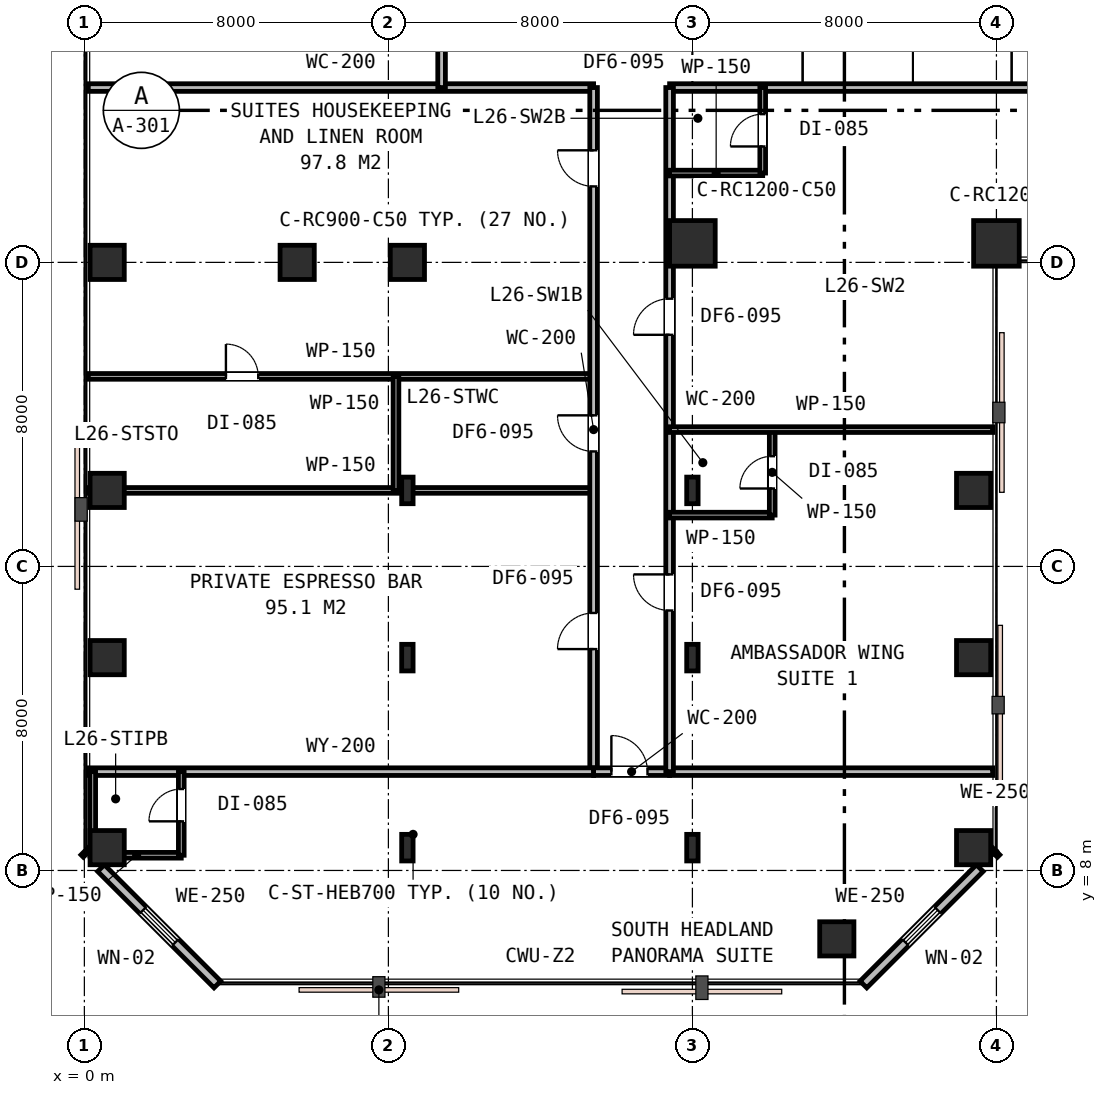
"""IFC4 building model, lengths in metres.
Left out: names, types, materials, properties, quantities, classifications, styles, units other than length and angle.
Written with IfcOpenShell. Run it as: python <this file> out.ifc"""

import sys

from ifc_helpers import new_model, si_unit, direction, frame, frame_2d, origin, origin_2d, place, context, subcontext, project, spatial, rectangle, i_section, extrude, element, fill, save


model = new_model("IFC4")
c1 = context("Model", 3, precision=1e-05, world=origin(), true_north=direction((0.0, 1.0)))
c2 = subcontext(c1, "Body", "Model", "MODEL_VIEW")
j1 = project(units=[si_unit("LENGTHUNIT", "METRE"), si_unit("PLANEANGLEUNIT", "RADIAN")], contexts=[c1])
p1 = place(None, origin())
s1 = spatial("IfcSite", under=j1, at=p1, CompositionType="ELEMENT")
p2 = place(p1, origin())
s2 = spatial("IfcBuilding", under=s1, at=p2, CompositionType="ELEMENT")
p3 = place(p2, frame((0.0, 0.0, 104.4)))
s3 = spatial("IfcBuildingStorey", under=s2, at=p3, CompositionType="ELEMENT", Elevation=104.4)
p4 = place(p3, frame((8.5, 24.0, 0.0), z_axis=(0.0, 0.0, 1.0), x_axis=(1.0, 0.0, 0.0)))
e1 = element("IfcColumn", 1, at=p4, inside=s3, PredefinedType="COLUMN", context=c2, shape_type="SweptSolid", body=[
    extrude(rectangle(XDim=0.9, YDim=0.9, at=origin_2d()), origin(), (0.0, 0.0, 1.0), 3.6),
])
for number, where, z_axis, x_axis in (
    (2, (16.0, 24.5, 0.0), (0.0, 0.0, 1.0), (1.0, 0.0, 0.0)),
    (3, (24.0, 24.5, 0.0), (0.0, 0.0, 1.0), (1.0, 0.0, 0.0)),
):
    element("IfcColumn", number, at=place(p3, frame(where, z_axis=z_axis, x_axis=x_axis)), inside=s3, PredefinedType="COLUMN", context=c2, shape_type="SweptSolid", body=[
        extrude(rectangle(XDim=1.2, YDim=1.2, at=origin_2d()), origin(), (0.0, 0.0, 1.0), 3.6),
    ])
for number, where, z_axis, x_axis in (
    (4, (5.6, 24.0, 0.0), (0.0, 0.0, 1.0), (1.0, 0.0, 0.0)),
    (5, (0.6, 24.0, 0.0), (0.0, 0.0, 1.0), (1.0, 0.0, 0.0)),
    (6, (0.6, 8.6, 0.0), (0.0, 0.0, 1.0), (1.0, 0.0, 0.0)),
    (7, (0.6, 13.6, 0.0), (0.0, 0.0, 1.0), (1.0, 0.0, 0.0)),
    (8, (0.6, 18.0, 0.0), (0.0, 0.0, 1.0), (1.0, 0.0, 0.0)),
    (9, (19.8, 6.2, 0.0), (0.0, 0.0, 1.0), (1.0, 0.0, 0.0)),
    (10, (23.4, 8.6, 0.0), (0.0, 0.0, 1.0), (1.0, 0.0, 0.0)),
    (11, (23.4, 13.6, 0.0), (0.0, 0.0, 1.0), (1.0, 0.0, 0.0)),
    (12, (23.4, 18.0, 0.0), (0.0, 0.0, 1.0), (1.0, 0.0, 0.0)),
):
    element("IfcColumn", number, at=place(p3, frame(where, z_axis=z_axis, x_axis=x_axis)), inside=s3, PredefinedType="COLUMN", context=c2, shape_type="SweptSolid", body=[
        extrude(rectangle(XDim=0.9, YDim=0.9, at=origin_2d()), origin(), (0.0, 0.0, 1.0), 3.6),
    ])
for number, where, z_axis, x_axis in (
    (13, (8.5, 8.6, 0.0), (0.0, 0.0, 1.0), (1.0, 0.0, 0.0)),
    (14, (16.0, 8.6, 0.0), (0.0, 0.0, 1.0), (1.0, 0.0, 0.0)),
    (15, (8.5, 13.6, 0.0), (0.0, 0.0, 1.0), (1.0, 0.0, 0.0)),
    (16, (16.0, 13.6, 0.0), (0.0, 0.0, 1.0), (1.0, 0.0, 0.0)),
    (17, (8.5, 18.0, 0.0), (0.0, 0.0, 1.0), (1.0, 0.0, 0.0)),
    (18, (16.0, 18.0, 0.0), (0.0, 0.0, 1.0), (1.0, 0.0, 0.0)),
):
    element("IfcColumn", number, at=place(p3, frame(where, z_axis=z_axis, x_axis=x_axis)), inside=s3, PredefinedType="COLUMN", context=c2, shape_type="SweptSolid", body=[
        extrude(i_section(OverallWidth=0.3, OverallDepth=0.7, WebThickness=0.017, FlangeThickness=0.032, FilletRadius=0.027, at=origin_2d()), origin(), (0.0, 0.0, 1.0), 3.6),
    ])
p5 = place(p3, frame((20.5, 5.0, 0.0), z_axis=(0.0, 0.0, 1.0), x_axis=(0.707106781187, 0.707106781187, 0.0)))
e19 = element("IfcWall", 19, at=p5, inside=s3, PredefinedType="STANDARD", context=c2, shape_type="SweptSolid", body=[
    extrude(rectangle(XDim=4.33, YDim=0.25, at=frame_2d((2.165, 0.0))), origin(), (0.0, 0.0, 1.0), 3.33),
])
p6 = place(p5, frame((1.565, 0.0, 0.85)))
e20 = element("IfcOpeningElement", 20, at=p6, cuts=e19, PredefinedType="OPENING", context=c2, shape_type="SweptSolid", body=[
    extrude(rectangle(XDim=1.2, YDim=1.6, at=frame_2d((0.6, 0.8))), frame((0.0, 0.135, 0.0), z_axis=(0.0, -1.0, 0.0), x_axis=(1.0, 0.0, 0.0)), (0.0, 0.0, 1.0), 0.27),
])
for number, where, z_axis, x_axis in (
    (21, (23.938, 8.438, 0.0), (0.0, 0.0, 1.0), (0.707, 0.707, 0.0)),
    (22, (0.0, 8.5, 0.0), (0.0, 0.0, 1.0), (0.707, -0.707, 0.0)),
):
    element("IfcWall", number, at=place(p3, frame(where, z_axis=z_axis, x_axis=x_axis)), inside=s3, PredefinedType="STANDARD", context=c2, shape_type="SweptSolid", body=[
        extrude(rectangle(XDim=0.087, YDim=0.25, at=frame_2d((0.044, 0.0))), origin(), (0.0, 0.0, 1.0), 3.33),
    ])
p7 = place(p3, frame((0.438, 8.062, 0.0), z_axis=(0.0, 0.0, 1.0), x_axis=(0.707106781187, -0.707106781187, 0.0)))
e23 = element("IfcWall", 23, at=p7, inside=s3, PredefinedType="STANDARD", context=c2, shape_type="SweptSolid", body=[
    extrude(rectangle(XDim=4.33, YDim=0.25, at=frame_2d((2.165, 0.0))), origin(), (0.0, 0.0, 1.0), 3.33),
])
p8 = place(p7, frame((1.565, 0.0, 0.85)))
e24 = element("IfcOpeningElement", 24, at=p8, cuts=e23, PredefinedType="OPENING", context=c2, shape_type="SweptSolid", body=[
    extrude(rectangle(XDim=1.2, YDim=1.6, at=frame_2d((0.6, 0.8))), frame((0.0, 0.135, 0.0), z_axis=(0.0, -1.0, 0.0), x_axis=(1.0, 0.0, 0.0)), (0.0, 0.0, 1.0), 0.27),
])
p9 = place(p3, frame((0.1, 28.6, 0.0), z_axis=(0.0, 0.0, 1.0), x_axis=(1.0, 0.0, 0.0)))
e25 = element("IfcWall", 25, at=p9, inside=s3, PredefinedType="PARTITIONING", context=c2, shape_type="SweptSolid", body=[
    extrude(rectangle(XDim=13.3, YDim=0.2, at=frame_2d((6.65, 0.0))), origin(), (0.0, 0.0, 1.0), 2.87),
])
p10 = place(p3, frame((15.4, 28.6, 0.0), z_axis=(0.0, 0.0, 1.0), x_axis=(1.0, 0.0, 0.0)))
e26 = element("IfcWall", 26, at=p10, inside=s3, PredefinedType="PARTITIONING", context=c2, shape_type="SweptSolid", body=[
    extrude(rectangle(XDim=28.8, YDim=0.2, at=frame_2d((14.4, 0.0))), origin(), (0.0, 0.0, 1.0), 2.87),
])
p11 = place(p10, frame((12.41, 0.0, 0.0)))
e27 = element("IfcOpeningElement", 27, at=p11, cuts=e26, PredefinedType="OPENING", context=c2, shape_type="SweptSolid", body=[
    extrude(rectangle(XDim=0.95, YDim=2.15, at=frame_2d((0.475, 1.075))), frame((0.0, 0.11, 0.0), z_axis=(0.0, -1.0, 0.0), x_axis=(1.0, 0.0, 0.0)), (0.0, 0.0, 1.0), 0.22),
])
p12 = place(p10, frame((22.68, 0.0, 0.0)))
e28 = element("IfcOpeningElement", 28, at=p12, cuts=e26, PredefinedType="OPENING", context=c2, shape_type="SweptSolid", body=[
    extrude(rectangle(XDim=0.95, YDim=2.15, at=frame_2d((0.475, 1.075))), frame((0.0, 0.11, 0.0), z_axis=(0.0, -1.0, 0.0), x_axis=(1.0, 0.0, 0.0)), (0.0, 0.0, 1.0), 0.22),
])
p13 = place(p3, frame((0.1, 18.0, 0.0), z_axis=(0.0, 0.0, 1.0), x_axis=(1.0, 0.0, 0.0)))
e29 = element("IfcWall", 29, at=p13, inside=s3, PredefinedType="PARTITIONING", context=c2, shape_type="SweptSolid", body=[
    extrude(rectangle(XDim=13.3, YDim=0.15, at=frame_2d((6.65, 0.0))), origin(), (0.0, 0.0, 1.0), 2.87),
])
p14 = place(p3, frame((0.1, 21.0, 0.0), z_axis=(0.0, 0.0, 1.0), x_axis=(1.0, 0.0, 0.0)))
e30 = element("IfcWall", 30, at=p14, inside=s3, PredefinedType="PARTITIONING", context=c2, shape_type="SweptSolid", body=[
    extrude(rectangle(XDim=13.3, YDim=0.15, at=frame_2d((6.65, 0.0))), origin(), (0.0, 0.0, 1.0), 2.87),
])
p15 = place(p14, frame((3.625, 0.0, 0.0)))
e31 = element("IfcOpeningElement", 31, at=p15, cuts=e30, PredefinedType="OPENING", context=c2, shape_type="SweptSolid", body=[
    extrude(rectangle(XDim=0.85, YDim=2.15, at=frame_2d((0.425, 1.075))), frame((0.0, 0.085, 0.0), z_axis=(0.0, -1.0, 0.0), x_axis=(1.0, 0.0, 0.0)), (0.0, 0.0, 1.0), 0.17),
])
p16 = place(p3, frame((8.2, 18.0, 0.0), z_axis=(0.0, 0.0, 1.0), x_axis=(0.0, 1.0, 0.0)))
e32 = element("IfcWall", 32, at=p16, inside=s3, PredefinedType="PARTITIONING", context=c2, shape_type="SweptSolid", body=[
    extrude(rectangle(XDim=3.0, YDim=0.15, at=frame_2d((1.5, 0.0))), origin(), (0.0, 0.0, 1.0), 2.87),
])
p17 = place(p3, frame((13.4, 10.6, 0.0), z_axis=(0.0, 0.0, 1.0), x_axis=(0.0, 1.0, 0.0)))
e33 = element("IfcWall", 33, at=p17, inside=s3, PredefinedType="PARTITIONING", context=c2, shape_type="SweptSolid", body=[
    extrude(rectangle(XDim=18.0, YDim=0.2, at=frame_2d((9.0, 0.0))), origin(), (0.0, 0.0, 1.0), 2.87),
])
p18 = place(p17, frame((8.425, 0.0, 0.0)))
e34 = element("IfcOpeningElement", 34, at=p18, cuts=e33, PredefinedType="OPENING", context=c2, shape_type="SweptSolid", body=[
    extrude(rectangle(XDim=0.95, YDim=2.15, at=frame_2d((0.475, 1.075))), frame((0.0, 0.11, 0.0), z_axis=(0.0, -1.0, 0.0), x_axis=(1.0, 0.0, 0.0)), (0.0, 0.0, 1.0), 0.22),
])
p19 = place(p17, frame((15.399, 0.0, 0.0)))
e35 = element("IfcOpeningElement", 35, at=p19, cuts=e33, PredefinedType="OPENING", context=c2, shape_type="SweptSolid", body=[
    extrude(rectangle(XDim=0.95, YDim=2.15, at=frame_2d((0.475, 1.075))), frame((0.0, 0.11, 0.0), z_axis=(0.0, -1.0, 0.0), x_axis=(1.0, 0.0, 0.0)), (0.0, 0.0, 1.0), 0.22),
])
p20 = place(p17, frame((3.225, 0.0, 0.0)))
e36 = element("IfcOpeningElement", 36, at=p20, cuts=e33, PredefinedType="OPENING", context=c2, shape_type="SweptSolid", body=[
    extrude(rectangle(XDim=0.95, YDim=2.15, at=frame_2d((0.475, 1.075))), frame((0.0, 0.11, 0.0), z_axis=(0.0, -1.0, 0.0), x_axis=(1.0, 0.0, 0.0)), (0.0, 0.0, 1.0), 0.22),
])
p21 = place(p3, frame((9.4, 28.6, 0.0), z_axis=(0.0, 0.0, 1.0), x_axis=(0.0, 1.0, 0.0)))
e37 = element("IfcWall", 37, at=p21, inside=s3, PredefinedType="PARTITIONING", context=c2, shape_type="SweptSolid", body=[
    extrude(rectangle(XDim=12.9, YDim=0.2, at=frame_2d((6.45, 0.0))), origin(), (0.0, 0.0, 1.0), 2.87),
])
p22 = place(p21, frame((3.825, 0.0, 0.0)))
e38 = element("IfcOpeningElement", 38, at=p22, cuts=e37, PredefinedType="OPENING", context=c2, shape_type="SweptSolid", body=[
    extrude(rectangle(XDim=0.95, YDim=2.15, at=frame_2d((0.475, 1.075))), frame((0.0, 0.11, 0.0), z_axis=(0.0, -1.0, 0.0), x_axis=(1.0, 0.0, 0.0)), (0.0, 0.0, 1.0), 0.22),
])
p23 = place(p21, frame((9.175, 0.0, 0.0)))
e39 = element("IfcOpeningElement", 39, at=p23, cuts=e37, PredefinedType="OPENING", context=c2, shape_type="SweptSolid", body=[
    extrude(rectangle(XDim=0.95, YDim=2.15, at=frame_2d((0.475, 1.075))), frame((0.0, 0.11, 0.0), z_axis=(0.0, -1.0, 0.0), x_axis=(1.0, 0.0, 0.0)), (0.0, 0.0, 1.0), 0.22),
])
p24 = place(p3, frame((0.1, 10.6, 0.0), z_axis=(0.0, 0.0, 1.0), x_axis=(1.0, 0.0, 0.0)))
e40 = element("IfcWall", 40, at=p24, inside=s3, PredefinedType="PARTITIONING", context=c2, shape_type="SweptSolid", body=[
    extrude(rectangle(XDim=13.3, YDim=0.2, at=frame_2d((6.65, 0.0))), origin(), (0.0, 0.0, 1.0), 2.87),
])
p25 = place(p3, frame((15.4, 10.6, 0.0), z_axis=(0.0, 0.0, 1.0), x_axis=(1.0, 0.0, 0.0)))
e41 = element("IfcWall", 41, at=p25, inside=s3, PredefinedType="PARTITIONING", context=c2, shape_type="SweptSolid", body=[
    extrude(rectangle(XDim=8.5, YDim=0.2, at=frame_2d((4.25, 0.0))), origin(), (0.0, 0.0, 1.0), 2.87),
])
p26 = place(p3, frame((13.4, 10.6, 0.0), z_axis=(0.0, 0.0, 1.0), x_axis=(1.0, 0.0, 0.0)))
e42 = element("IfcWall", 42, at=p26, inside=s3, PredefinedType="PARTITIONING", context=c2, shape_type="SweptSolid", body=[
    extrude(rectangle(XDim=2.0, YDim=0.2, at=frame_2d((1.0, 0.0))), origin(), (0.0, 0.0, 1.0), 3.01),
])
p27 = place(p26, frame((0.468, 0.0, 0.0)))
e43 = element("IfcOpeningElement", 43, at=p27, cuts=e42, PredefinedType="OPENING", context=c2, shape_type="SweptSolid", body=[
    extrude(rectangle(XDim=0.95, YDim=2.15, at=frame_2d((0.475, 1.075))), frame((0.0, 0.11, 0.0), z_axis=(0.0, -1.0, 0.0), x_axis=(1.0, 0.0, 0.0)), (0.0, 0.0, 1.0), 0.22),
])
p28 = place(p3, frame((0.2, 8.4, 0.0), z_axis=(0.0, 0.0, 1.0), x_axis=(1.0, 0.0, 0.0)))
e44 = element("IfcWall", 44, at=p28, inside=s3, PredefinedType="PARTITIONING", context=c2, shape_type="SweptSolid", body=[
    extrude(rectangle(XDim=2.35, YDim=0.15, at=frame_2d((1.175, 0.0))), origin(), (0.0, 0.0, 1.0), 2.87),
])
p29 = place(p3, frame((2.55, 8.4, 0.0), z_axis=(0.0, 0.0, 1.0), x_axis=(0.0, 1.0, 0.0)))
e45 = element("IfcWall", 45, at=p29, inside=s3, PredefinedType="PARTITIONING", context=c2, shape_type="SweptSolid", body=[
    extrude(rectangle(XDim=2.2, YDim=0.15, at=frame_2d((1.1, 0.0))), origin(), (0.0, 0.0, 1.0), 2.87),
])
p30 = place(p29, frame((0.892, 0.0, 0.0)))
e46 = element("IfcOpeningElement", 46, at=p30, cuts=e45, PredefinedType="OPENING", context=c2, shape_type="SweptSolid", body=[
    extrude(rectangle(XDim=0.85, YDim=2.15, at=frame_2d((0.425, 1.075))), frame((0.0, 0.085, 0.0), z_axis=(0.0, -1.0, 0.0), x_axis=(1.0, 0.0, 0.0)), (0.0, 0.0, 1.0), 0.17),
])
p31 = place(p3, frame((0.22, 8.38, 0.0), z_axis=(0.0, 0.0, 1.0), x_axis=(0.0, 1.0, 0.0)))
e47 = element("IfcWall", 47, at=p31, inside=s3, PredefinedType="PARTITIONING", context=c2, shape_type="SweptSolid", body=[
    extrude(rectangle(XDim=2.22, YDim=0.15, at=frame_2d((1.11, 0.0))), origin(), (0.0, 0.0, 1.0), 2.87),
])
p32 = place(p3, frame((15.4, 10.6, 0.0), z_axis=(0.0, 0.0, 1.0), x_axis=(0.0, 1.0, 0.0)))
e48 = element("IfcWall", 48, at=p32, inside=s3, PredefinedType="PARTITIONING", context=c2, shape_type="SweptSolid", body=[
    extrude(rectangle(XDim=18.0, YDim=0.2, at=frame_2d((9.0, 0.0))), origin(), (0.0, 0.0, 1.0), 2.87),
])
p33 = place(p32, frame((4.24, 0.0, 0.0)))
e49 = element("IfcOpeningElement", 49, at=p33, cuts=e48, PredefinedType="OPENING", context=c2, shape_type="SweptSolid", body=[
    extrude(rectangle(XDim=0.95, YDim=2.15, at=frame_2d((0.475, 1.075))), frame((0.0, 0.11, 0.0), z_axis=(0.0, -1.0, 0.0), x_axis=(1.0, 0.0, 0.0)), (0.0, 0.0, 1.0), 0.22),
])
p34 = place(p32, frame((11.494, 0.0, 0.0)))
e50 = element("IfcOpeningElement", 50, at=p34, cuts=e48, PredefinedType="OPENING", context=c2, shape_type="SweptSolid", body=[
    extrude(rectangle(XDim=0.95, YDim=2.15, at=frame_2d((0.475, 1.075))), frame((0.0, 0.11, 0.0), z_axis=(0.0, -1.0, 0.0), x_axis=(1.0, 0.0, 0.0)), (0.0, 0.0, 1.0), 0.22),
])
p35 = place(p3, frame((15.4, 17.35, 0.0), z_axis=(0.0, 0.0, 1.0), x_axis=(1.0, 0.0, 0.0)))
e51 = element("IfcWall", 51, at=p35, inside=s3, PredefinedType="PARTITIONING", context=c2, shape_type="SweptSolid", body=[
    extrude(rectangle(XDim=2.7, YDim=0.15, at=frame_2d((1.35, 0.0))), origin(), (0.0, 0.0, 1.0), 2.87),
])
p36 = place(p3, frame((18.1, 17.35, 0.0), z_axis=(0.0, 0.0, 1.0), x_axis=(0.0, 1.0, 0.0)))
e52 = element("IfcWall", 52, at=p36, inside=s3, PredefinedType="PARTITIONING", context=c2, shape_type="SweptSolid", body=[
    extrude(rectangle(XDim=2.25, YDim=0.15, at=frame_2d((1.125, 0.0))), origin(), (0.0, 0.0, 1.0), 2.87),
])
p37 = place(p36, frame((0.7, 0.0, 0.0)))
e53 = element("IfcOpeningElement", 53, at=p37, cuts=e52, PredefinedType="OPENING", context=c2, shape_type="SweptSolid", body=[
    extrude(rectangle(XDim=0.85, YDim=2.15, at=frame_2d((0.425, 1.075))), frame((0.0, 0.085, 0.0), z_axis=(0.0, -1.0, 0.0), x_axis=(1.0, 0.0, 0.0)), (0.0, 0.0, 1.0), 0.17),
])
p38 = place(p3, frame((15.4, 19.6, 0.0), z_axis=(0.0, 0.0, 1.0), x_axis=(1.0, 0.0, 0.0)))
e54 = element("IfcWall", 54, at=p38, inside=s3, PredefinedType="PARTITIONING", context=c2, shape_type="SweptSolid", body=[
    extrude(rectangle(XDim=8.5, YDim=0.15, at=frame_2d((4.25, 0.0))), origin(), (0.0, 0.0, 1.0), 2.87),
])
p39 = place(p3, frame((15.4, 26.35, 0.0), z_axis=(0.0, 0.0, 1.0), x_axis=(1.0, 0.0, 0.0)))
e55 = element("IfcWall", 55, at=p39, inside=s3, PredefinedType="PARTITIONING", context=c2, shape_type="SweptSolid", body=[
    extrude(rectangle(XDim=2.45, YDim=0.15, at=frame_2d((1.225, 0.0))), origin(), (0.0, 0.0, 1.0), 2.87),
])
p40 = place(p3, frame((17.85, 26.35, 0.0), z_axis=(0.0, 0.0, 1.0), x_axis=(0.0, 1.0, 0.0)))
e56 = element("IfcWall", 56, at=p40, inside=s3, PredefinedType="PARTITIONING", context=c2, shape_type="SweptSolid", body=[
    extrude(rectangle(XDim=2.25, YDim=0.15, at=frame_2d((1.125, 0.0))), origin(), (0.0, 0.0, 1.0), 3.33),
])
p41 = place(p40, frame((0.7, 0.0, 0.0)))
e57 = element("IfcOpeningElement", 57, at=p41, cuts=e56, PredefinedType="OPENING", context=c2, shape_type="SweptSolid", body=[
    extrude(rectangle(XDim=0.85, YDim=2.15, at=frame_2d((0.425, 1.075))), frame((0.0, 0.085, 0.0), z_axis=(0.0, -1.0, 0.0), x_axis=(1.0, 0.0, 0.0)), (0.0, 0.0, 1.0), 0.17),
])
p42 = place(p6, origin())
e58 = element("IfcWindow", 58, at=p42, inside=s3, PartitioningType="SINGLE_PANEL", PredefinedType="WINDOW", context=c2, shape_type="SweptSolid", body=[
    extrude(rectangle(XDim=1.2, YDim=1.6, at=frame_2d((0.6, 0.8))), frame((0.0, 0.03, 0.0), z_axis=(0.0, -1.0, 0.0), x_axis=(1.0, 0.0, 0.0)), (0.0, 0.0, 1.0), 0.06),
])
fill(e20, e58)
p43 = place(p8, origin())
e59 = element("IfcWindow", 59, at=p43, inside=s3, PartitioningType="SINGLE_PANEL", PredefinedType="WINDOW", context=c2, shape_type="SweptSolid", body=[
    extrude(rectangle(XDim=1.2, YDim=1.6, at=frame_2d((0.6, 0.8))), frame((0.0, 0.03, 0.0), z_axis=(0.0, -1.0, 0.0), x_axis=(1.0, 0.0, 0.0)), (0.0, 0.0, 1.0), 0.06),
])
fill(e24, e59)
p44 = place(p18, origin())
e60 = element("IfcDoor", 60, at=p44, inside=s3, OperationType="SINGLE_SWING_RIGHT", PredefinedType="DOOR", context=c2, shape_type="SweptSolid", body=[
    extrude(rectangle(XDim=0.95, YDim=2.15, at=frame_2d((0.475, 1.075))), frame((0.0, 0.025, 0.0), z_axis=(0.0, -1.0, 0.0), x_axis=(1.0, 0.0, 0.0)), (0.0, 0.0, 1.0), 0.05),
])
fill(e34, e60)
p45 = place(p15, origin())
e61 = element("IfcDoor", 61, at=p45, inside=s3, OperationType="SINGLE_SWING_LEFT", PredefinedType="DOOR", context=c2, shape_type="SweptSolid", body=[
    extrude(rectangle(XDim=0.85, YDim=2.15, at=frame_2d((0.425, 1.075))), frame((0.0, 0.025, 0.0), z_axis=(0.0, -1.0, 0.0), x_axis=(1.0, 0.0, 0.0)), (0.0, 0.0, 1.0), 0.05),
])
fill(e31, e61)
p46 = place(p19, origin())
e62 = element("IfcDoor", 62, at=p46, inside=s3, OperationType="SINGLE_SWING_RIGHT", PredefinedType="DOOR", context=c2, shape_type="SweptSolid", body=[
    extrude(rectangle(XDim=0.95, YDim=2.15, at=frame_2d((0.475, 1.075))), frame((0.0, 0.025, 0.0), z_axis=(0.0, -1.0, 0.0), x_axis=(1.0, 0.0, 0.0)), (0.0, 0.0, 1.0), 0.05),
])
fill(e35, e62)
p47 = place(p20, origin())
e63 = element("IfcDoor", 63, at=p47, inside=s3, OperationType="SINGLE_SWING_LEFT", PredefinedType="DOOR", context=c2, shape_type="SweptSolid", body=[
    extrude(rectangle(XDim=0.95, YDim=2.15, at=frame_2d((0.475, 1.075))), frame((0.0, 0.025, 0.0), z_axis=(0.0, -1.0, 0.0), x_axis=(1.0, 0.0, 0.0)), (0.0, 0.0, 1.0), 0.05),
])
fill(e36, e63)
p48 = place(p27, origin())
e64 = element("IfcDoor", 64, at=p48, inside=s3, OperationType="SINGLE_SWING_LEFT", PredefinedType="DOOR", context=c2, shape_type="SweptSolid", body=[
    extrude(rectangle(XDim=0.95, YDim=2.15, at=frame_2d((0.475, 1.075))), frame((0.0, 0.025, 0.0), z_axis=(0.0, -1.0, 0.0), x_axis=(1.0, 0.0, 0.0)), (0.0, 0.0, 1.0), 0.05),
])
fill(e43, e64)
p49 = place(p30, origin())
e65 = element("IfcDoor", 65, at=p49, inside=s3, OperationType="SINGLE_SWING_LEFT", PredefinedType="DOOR", context=c2, shape_type="SweptSolid", body=[
    extrude(rectangle(XDim=0.85, YDim=2.15, at=frame_2d((0.425, 1.075))), frame((0.0, 0.025, 0.0), z_axis=(0.0, -1.0, 0.0), x_axis=(1.0, 0.0, 0.0)), (0.0, 0.0, 1.0), 0.05),
])
fill(e46, e65)
p50 = place(p33, origin())
e66 = element("IfcDoor", 66, at=p50, inside=s3, OperationType="SINGLE_SWING_RIGHT", PredefinedType="DOOR", context=c2, shape_type="SweptSolid", body=[
    extrude(rectangle(XDim=0.95, YDim=2.15, at=frame_2d((0.475, 1.075))), frame((0.0, 0.025, 0.0), z_axis=(0.0, -1.0, 0.0), x_axis=(1.0, 0.0, 0.0)), (0.0, 0.0, 1.0), 0.05),
])
fill(e49, e66)
p51 = place(p37, origin())
e67 = element("IfcDoor", 67, at=p51, inside=s3, OperationType="SINGLE_SWING_LEFT", PredefinedType="DOOR", context=c2, shape_type="SweptSolid", body=[
    extrude(rectangle(XDim=0.85, YDim=2.15, at=frame_2d((0.425, 1.075))), frame((0.0, 0.025, 0.0), z_axis=(0.0, -1.0, 0.0), x_axis=(1.0, 0.0, 0.0)), (0.0, 0.0, 1.0), 0.05),
])
fill(e53, e67)
p52 = place(p34, origin())
e68 = element("IfcDoor", 68, at=p52, inside=s3, OperationType="SINGLE_SWING_LEFT", PredefinedType="DOOR", context=c2, shape_type="SweptSolid", body=[
    extrude(rectangle(XDim=0.95, YDim=2.15, at=frame_2d((0.475, 1.075))), frame((0.0, 0.025, 0.0), z_axis=(0.0, -1.0, 0.0), x_axis=(1.0, 0.0, 0.0)), (0.0, 0.0, 1.0), 0.05),
])
fill(e50, e68)
p53 = place(p41, origin())
e69 = element("IfcDoor", 69, at=p53, inside=s3, OperationType="SINGLE_SWING_LEFT", PredefinedType="DOOR", context=c2, shape_type="SweptSolid", body=[
    extrude(rectangle(XDim=0.85, YDim=2.15, at=frame_2d((0.425, 1.075))), frame((0.0, 0.025, 0.0), z_axis=(0.0, -1.0, 0.0), x_axis=(1.0, 0.0, 0.0)), (0.0, 0.0, 1.0), 0.05),
])
fill(e57, e69)
save(model, sys.argv[1])
